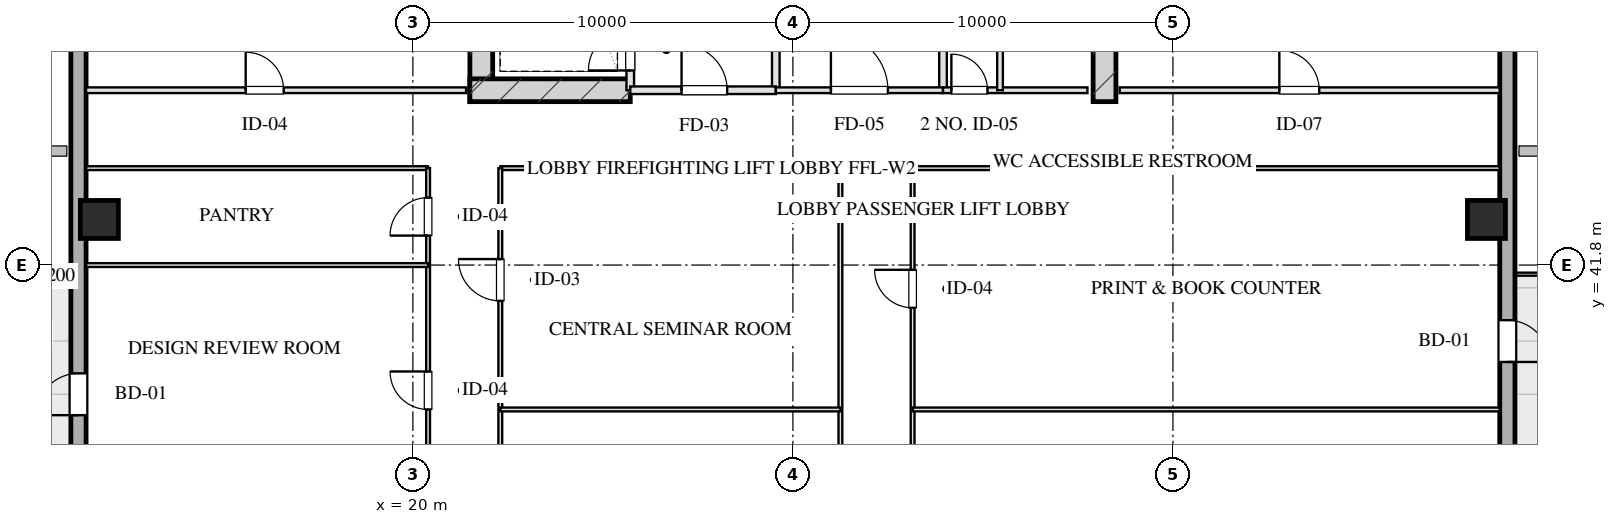
"""IFC4 building model, lengths in metres.
Left out: names, types, materials, properties, quantities, classifications, styles, units other than length and angle.
Written with IfcOpenShell. Run it as: python <this file> out.ifc"""

import sys

from ifc_helpers import new_model, si_unit, direction, frame, frame_2d, origin, origin_2d, place, context, subcontext, project, spatial, rectangle, hollow_rectangle, extrude, element, fill, save


model = new_model("IFC4")
c1 = context("Model", 3, precision=1e-05, world=origin(), true_north=direction((0.0, 1.0)))
c2 = subcontext(c1, "Body", "Model", "MODEL_VIEW")
j1 = project(units=[si_unit("LENGTHUNIT", "METRE"), si_unit("PLANEANGLEUNIT", "RADIAN")], contexts=[c1])
p1 = place(None, origin())
s1 = spatial("IfcSite", under=j1, at=p1, CompositionType="ELEMENT")
p2 = place(p1, origin())
s2 = spatial("IfcBuilding", under=s1, at=p2, CompositionType="ELEMENT")
p3 = place(p2, frame((0.0, 0.0, 142.6)))
s3 = spatial("IfcBuildingStorey", under=s2, at=p3, CompositionType="ELEMENT", Elevation=142.6)
for number, where, z_axis, x_axis in (
    (1, (21.8, 46.1, 0.0), (0.0, 0.0, 1.0), (0.0, 1.0, 0.0)),
    (2, (38.2, 46.1, 0.0), (0.0, 0.0, 1.0), (0.0, 1.0, 0.0)),
):
    element("IfcWall", number, at=place(p3, frame(where, z_axis=z_axis, x_axis=x_axis)), inside=s3, PredefinedType="SHEAR", context=c2, shape_type="SweptSolid", body=[
        extrude(rectangle(XDim=9.48, YDim=0.6, at=frame_2d((4.74, 0.0))), origin(), (0.0, 0.0, 1.0), 3.45),
    ])
p4 = place(p3, frame((21.5, 46.4, 0.0), z_axis=(0.0, 0.0, 1.0), x_axis=(1.0, 0.0, 0.0)))
e3 = element("IfcWall", 3, at=p4, inside=s3, PredefinedType="SHEAR", context=c2, shape_type="SweptSolid", body=[
    extrude(rectangle(XDim=4.22, YDim=0.6, at=frame_2d((2.11, 0.0))), origin(), (0.0, 0.0, 1.0), 3.45),
])
for number, where, z_axis, x_axis in (
    (4, (11.75, 43.0, 0.0), (0.0, 0.0, 1.0), (1.0, 0.0, 0.0)),
    (5, (48.25, 43.0, 0.0), (0.0, 0.0, 1.0), (1.0, 0.0, 0.0)),
):
    element("IfcColumn", number, at=place(p3, frame(where, z_axis=z_axis, x_axis=x_axis)), inside=s3, PredefinedType="COLUMN", context=c2, shape_type="SweptSolid", body=[
        extrude(hollow_rectangle(XDim=1.0, YDim=1.0, WallThickness=0.036, at=origin_2d()), origin(), (0.0, 0.0, 1.0), 3.451),
    ])
p5 = place(p3, frame((11.2, 9.0, 0.0), z_axis=(0.0, 0.0, 1.0), x_axis=(0.0, 1.0, 0.0)))
e6 = element("IfcWall", 6, at=p5, inside=s3, PredefinedType="SOLIDWALL", context=c2, shape_type="SweptSolid", body=[
    extrude(rectangle(XDim=50.0, YDim=0.4, at=frame_2d((25.0, 0.0))), origin(), (0.0, 0.0, 1.0), 2.61),
])
p6 = place(p5, frame((28.85, 0.0, 0.0)))
e7 = element("IfcOpeningElement", 7, at=p6, cuts=e6, PredefinedType="OPENING", context=c2, shape_type="SweptSolid", body=[
    extrude(rectangle(XDim=1.1, YDim=2.15, at=frame_2d((0.55, 1.075))), frame((0.0, 0.21, 0.0), z_axis=(0.0, -1.0, 0.0), x_axis=(1.0, 0.0, 0.0)), (0.0, 0.0, 1.0), 0.42),
])
p7 = place(p3, frame((48.8, 59.0, 0.0), z_axis=(0.0, 0.0, 1.0), x_axis=(0.0, -1.0, 0.0)))
e8 = element("IfcWall", 8, at=p7, inside=s3, PredefinedType="SOLIDWALL", context=c2, shape_type="SweptSolid", body=[
    extrude(rectangle(XDim=50.0, YDim=0.4, at=frame_2d((25.0, 0.0))), origin(), (0.0, 0.0, 1.0), 2.61),
])
p8 = place(p7, frame((30.275, 0.0, 0.75)))
e9 = element("IfcOpeningElement", 9, at=p8, cuts=e8, PredefinedType="OPENING", context=c2, shape_type="SweptSolid", body=[
    extrude(rectangle(XDim=2.25, YDim=1.46, at=frame_2d((1.125, 0.73))), frame((0.0, 0.21, 0.0), z_axis=(0.0, -1.0, 0.0), x_axis=(1.0, 0.0, 0.0)), (0.0, 0.0, 1.0), 0.42),
])
p9 = place(p7, frame((18.65, 0.0, 0.0)))
e10 = element("IfcOpeningElement", 10, at=p9, cuts=e8, PredefinedType="OPENING", context=c2, shape_type="SweptSolid", body=[
    extrude(rectangle(XDim=1.1, YDim=2.15, at=frame_2d((0.55, 1.075))), frame((0.0, 0.21, 0.0), z_axis=(0.0, -1.0, 0.0), x_axis=(1.0, 0.0, 0.0)), (0.0, 0.0, 1.0), 0.42),
])
p10 = place(p3, frame((25.72, 46.4, 0.0), z_axis=(0.0, 0.0, 1.0), x_axis=(0.0, 1.0, 0.0)))
e11 = element("IfcWall", 11, at=p10, inside=s3, PredefinedType="PARTITIONING", context=c2, shape_type="SweptSolid", body=[
    extrude(rectangle(XDim=1.9, YDim=0.2, at=frame_2d((0.95, 0.0))), origin(), (0.0, 0.0, 1.0), 3.175),
])
p11 = place(p10, frame((0.52, 0.0, 0.0)))
e12 = element("IfcOpeningElement", 12, at=p11, cuts=e11, PredefinedType="OPENING", context=c2, shape_type="SweptSolid", body=[
    extrude(rectangle(XDim=1.1, YDim=2.05, at=frame_2d((0.55, 1.025))), frame((0.0, 0.11, 0.0), z_axis=(0.0, -1.0, 0.0), x_axis=(1.0, 0.0, 0.0)), (0.0, 0.0, 1.0), 0.22),
])
p12 = place(p3, frame((29.55, 46.4, 0.0), z_axis=(0.0, 0.0, 1.0), x_axis=(0.0, 1.0, 0.0)))
e13 = element("IfcWall", 13, at=p12, inside=s3, PredefinedType="PARTITIONING", context=c2, shape_type="SweptSolid", body=[
    extrude(rectangle(XDim=8.43, YDim=0.2, at=frame_2d((4.215, 0.0))), origin(), (0.0, 0.0, 1.0), 3.175),
])
p13 = place(p3, frame((25.72, 46.4, 0.0), z_axis=(0.0, 0.0, 1.0), x_axis=(1.0, 0.0, 0.0)))
e14 = element("IfcWall", 14, at=p13, inside=s3, PredefinedType="PARTITIONING", context=c2, shape_type="SweptSolid", body=[
    extrude(rectangle(XDim=3.83, YDim=0.2, at=frame_2d((1.915, 0.0))), origin(), (0.0, 0.0, 1.0), 3.175),
])
p14 = place(p13, frame((1.35, 0.0, 0.0)))
e15 = element("IfcOpeningElement", 15, at=p14, cuts=e14, PredefinedType="OPENING", context=c2, shape_type="SweptSolid", body=[
    extrude(rectangle(XDim=1.2, YDim=2.05, at=frame_2d((0.6, 1.025))), frame((0.0, 0.11, 0.0), z_axis=(0.0, -1.0, 0.0), x_axis=(1.0, 0.0, 0.0)), (0.0, 0.0, 1.0), 0.22),
])
p15 = place(p3, frame((33.95, 46.4, 0.0), z_axis=(0.0, 0.0, 1.0), x_axis=(0.0, 1.0, 0.0)))
e16 = element("IfcWall", 16, at=p15, inside=s3, PredefinedType="PARTITIONING", context=c2, shape_type="SweptSolid", body=[
    extrude(rectangle(XDim=8.43, YDim=0.2, at=frame_2d((4.215, 0.0))), origin(), (0.0, 0.0, 1.0), 3.175),
])
p16 = place(p3, frame((29.55, 46.4, 0.0), z_axis=(0.0, 0.0, 1.0), x_axis=(1.0, 0.0, 0.0)))
e17 = element("IfcWall", 17, at=p16, inside=s3, PredefinedType="PARTITIONING", context=c2, shape_type="SweptSolid", body=[
    extrude(rectangle(XDim=4.4, YDim=0.15, at=frame_2d((2.2, 0.0))), origin(), (0.0, 0.0, 1.0), 3.175),
])
p17 = place(p16, frame((1.45, 0.0, 0.0)))
e18 = element("IfcOpeningElement", 18, at=p17, cuts=e17, PredefinedType="OPENING", context=c2, shape_type="SweptSolid", body=[
    extrude(rectangle(XDim=1.5, YDim=2.05, at=frame_2d((0.75, 1.025))), frame((0.0, 0.085, 0.0), z_axis=(0.0, -1.0, 0.0), x_axis=(1.0, 0.0, 0.0)), (0.0, 0.0, 1.0), 0.17),
])
p18 = place(p3, frame((33.95, 46.4, 0.0), z_axis=(0.0, 0.0, 1.0), x_axis=(1.0, 0.0, 0.0)))
e19 = element("IfcWall", 19, at=p18, inside=s3, PredefinedType="PARTITIONING", context=c2, shape_type="SweptSolid", body=[
    extrude(rectangle(XDim=3.8, YDim=0.15, at=frame_2d((1.9, 0.0))), origin(), (0.0, 0.0, 1.0), 3.175),
])
p19 = place(p18, frame((0.22, 0.0, 0.0)))
e20 = element("IfcOpeningElement", 20, at=p19, cuts=e19, PredefinedType="OPENING", context=c2, shape_type="SweptSolid", body=[
    extrude(rectangle(XDim=0.95, YDim=2.05, at=frame_2d((0.475, 1.025))), frame((0.0, 0.085, 0.0), z_axis=(0.0, -1.0, 0.0), x_axis=(1.0, 0.0, 0.0)), (0.0, 0.0, 1.0), 0.17),
])
p20 = place(p3, frame((35.45, 46.4, 0.0), z_axis=(0.0, 0.0, 1.0), x_axis=(0.0, 1.0, 0.0)))
e21 = element("IfcWall", 21, at=p20, inside=s3, PredefinedType="PARTITIONING", context=c2, shape_type="SweptSolid", body=[
    extrude(rectangle(XDim=8.43, YDim=0.15, at=frame_2d((4.215, 0.0))), origin(), (0.0, 0.0, 1.0), 2.815),
])
p21 = place(p20, frame((2.55, 0.0, 0.0)))
e22 = element("IfcOpeningElement", 22, at=p21, cuts=e21, PredefinedType="OPENING", context=c2, shape_type="SweptSolid", body=[
    extrude(rectangle(XDim=0.95, YDim=2.05, at=frame_2d((0.475, 1.025))), frame((0.0, 0.085, 0.0), z_axis=(0.0, -1.0, 0.0), x_axis=(1.0, 0.0, 0.0)), (0.0, 0.0, 1.0), 0.17),
])
p22 = place(p20, frame((5.8, 0.0, 0.0)))
e23 = element("IfcOpeningElement", 23, at=p22, cuts=e21, PredefinedType="OPENING", context=c2, shape_type="SweptSolid", body=[
    extrude(rectangle(XDim=0.9, YDim=2.05, at=frame_2d((0.45, 1.025))), frame((0.0, 0.085, 0.0), z_axis=(0.0, -1.0, 0.0), x_axis=(1.0, 0.0, 0.0)), (0.0, 0.0, 1.0), 0.17),
])
p23 = place(p3, frame((11.4, 46.4, 0.0), z_axis=(0.0, 0.0, 1.0), x_axis=(1.0, 0.0, 0.0)))
e24 = element("IfcWall", 24, at=p23, inside=s3, PredefinedType="PARTITIONING", context=c2, shape_type="SweptSolid", body=[
    extrude(rectangle(XDim=10.0, YDim=0.15, at=frame_2d((5.0, 0.0))), origin(), (0.0, 0.0, 1.0), 3.175),
])
p24 = place(p23, frame((4.2, 0.0, 0.0)))
e25 = element("IfcOpeningElement", 25, at=p24, cuts=e24, PredefinedType="OPENING", context=c2, shape_type="SweptSolid", body=[
    extrude(rectangle(XDim=1.0, YDim=2.05, at=frame_2d((0.5, 1.025))), frame((0.0, 0.085, 0.0), z_axis=(0.0, -1.0, 0.0), x_axis=(1.0, 0.0, 0.0)), (0.0, 0.0, 1.0), 0.17),
])
p25 = place(p3, frame((38.6, 46.4, 0.0), z_axis=(0.0, 0.0, 1.0), x_axis=(1.0, 0.0, 0.0)))
e26 = element("IfcWall", 26, at=p25, inside=s3, PredefinedType="PARTITIONING", context=c2, shape_type="SweptSolid", body=[
    extrude(rectangle(XDim=10.0, YDim=0.15, at=frame_2d((5.0, 0.0))), origin(), (0.0, 0.0, 1.0), 3.175),
])
p26 = place(p25, frame((4.2, 0.0, 0.0)))
e27 = element("IfcOpeningElement", 27, at=p26, cuts=e26, PredefinedType="OPENING", context=c2, shape_type="SweptSolid", body=[
    extrude(rectangle(XDim=1.05, YDim=2.05, at=frame_2d((0.525, 1.025))), frame((0.0, 0.085, 0.0), z_axis=(0.0, -1.0, 0.0), x_axis=(1.0, 0.0, 0.0)), (0.0, 0.0, 1.0), 0.17),
])
p27 = place(p3, frame((11.4, 44.35, 0.0), z_axis=(0.0, 0.0, 1.0), x_axis=(1.0, 0.0, 0.0)))
e28 = element("IfcWall", 28, at=p27, inside=s3, PredefinedType="MOVABLE", context=c2, shape_type="SweptSolid", body=[
    extrude(rectangle(XDim=9.0, YDim=0.1, at=frame_2d((4.5, 0.0))), origin(), (0.0, 0.0, 1.0), 3.175),
])
p28 = place(p3, frame((22.3, 44.35, 0.0), z_axis=(0.0, 0.0, 1.0), x_axis=(1.0, 0.0, 0.0)))
e29 = element("IfcWall", 29, at=p28, inside=s3, PredefinedType="MOVABLE", context=c2, shape_type="SweptSolid", body=[
    extrude(rectangle(XDim=8.95, YDim=0.1, at=frame_2d((4.475, 0.0))), origin(), (0.0, 0.0, 1.0), 3.175),
])
p29 = place(p3, frame((33.15, 44.35, 0.0), z_axis=(0.0, 0.0, 1.0), x_axis=(1.0, 0.0, 0.0)))
e30 = element("IfcWall", 30, at=p29, inside=s3, PredefinedType="MOVABLE", context=c2, shape_type="SweptSolid", body=[
    extrude(rectangle(XDim=15.45, YDim=0.1, at=frame_2d((7.725, 0.0))), origin(), (0.0, 0.0, 1.0), 3.175),
])
p30 = place(p3, frame((20.4, 23.65, 0.0), z_axis=(0.0, 0.0, 1.0), x_axis=(0.0, 1.0, 0.0)))
e31 = element("IfcWall", 31, at=p30, inside=s3, PredefinedType="MOVABLE", context=c2, shape_type="SweptSolid", body=[
    extrude(rectangle(XDim=20.7, YDim=0.1, at=frame_2d((10.35, 0.0))), origin(), (0.0, 0.0, 1.0), 3.175),
])
p31 = place(p30, frame((0.775, 0.0, 0.0)))
e32 = element("IfcOpeningElement", 32, at=p31, cuts=e31, PredefinedType="OPENING", context=c2, shape_type="SweptSolid", body=[
    extrude(rectangle(XDim=1.0, YDim=2.05, at=frame_2d((0.5, 1.025))), frame((0.0, 0.06, 0.0), z_axis=(0.0, -1.0, 0.0), x_axis=(1.0, 0.0, 0.0)), (0.0, 0.0, 1.0), 0.12),
])
p32 = place(p30, frame((5.35, 0.0, 0.0)))
e33 = element("IfcOpeningElement", 33, at=p32, cuts=e31, PredefinedType="OPENING", context=c2, shape_type="SweptSolid", body=[
    extrude(rectangle(XDim=1.0, YDim=2.05, at=frame_2d((0.5, 1.025))), frame((0.0, 0.06, 0.0), z_axis=(0.0, -1.0, 0.0), x_axis=(1.0, 0.0, 0.0)), (0.0, 0.0, 1.0), 0.12),
])
p33 = place(p30, frame((9.85, 0.0, 0.0)))
e34 = element("IfcOpeningElement", 34, at=p33, cuts=e31, PredefinedType="OPENING", context=c2, shape_type="SweptSolid", body=[
    extrude(rectangle(XDim=1.0, YDim=2.05, at=frame_2d((0.5, 1.025))), frame((0.0, 0.06, 0.0), z_axis=(0.0, -1.0, 0.0), x_axis=(1.0, 0.0, 0.0)), (0.0, 0.0, 1.0), 0.12),
])
p34 = place(p30, frame((14.35, 0.0, 0.0)))
e35 = element("IfcOpeningElement", 35, at=p34, cuts=e31, PredefinedType="OPENING", context=c2, shape_type="SweptSolid", body=[
    extrude(rectangle(XDim=1.0, YDim=2.05, at=frame_2d((0.5, 1.025))), frame((0.0, 0.06, 0.0), z_axis=(0.0, -1.0, 0.0), x_axis=(1.0, 0.0, 0.0)), (0.0, 0.0, 1.0), 0.12),
])
p35 = place(p30, frame((18.925, 0.0, 0.0)))
e36 = element("IfcOpeningElement", 36, at=p35, cuts=e31, PredefinedType="OPENING", context=c2, shape_type="SweptSolid", body=[
    extrude(rectangle(XDim=1.0, YDim=2.05, at=frame_2d((0.5, 1.025))), frame((0.0, 0.06, 0.0), z_axis=(0.0, -1.0, 0.0), x_axis=(1.0, 0.0, 0.0)), (0.0, 0.0, 1.0), 0.12),
])
p36 = place(p3, frame((22.3, 23.65, 0.0), z_axis=(0.0, 0.0, 1.0), x_axis=(0.0, 1.0, 0.0)))
e37 = element("IfcWall", 37, at=p36, inside=s3, PredefinedType="MOVABLE", context=c2, shape_type="SweptSolid", body=[
    extrude(rectangle(XDim=20.7, YDim=0.1, at=frame_2d((10.35, 0.0))), origin(), (0.0, 0.0, 1.0), 3.175),
])
p37 = place(p36, frame((2.857, 0.0, 0.0)))
e38 = element("IfcOpeningElement", 38, at=p37, cuts=e37, PredefinedType="OPENING", context=c2, shape_type="SweptSolid", body=[
    extrude(rectangle(XDim=1.1, YDim=2.05, at=frame_2d((0.55, 1.025))), frame((0.0, 0.06, 0.0), z_axis=(0.0, -1.0, 0.0), x_axis=(1.0, 0.0, 0.0)), (0.0, 0.0, 1.0), 0.12),
])
p38 = place(p36, frame((17.208, 0.0, 0.0)))
e39 = element("IfcOpeningElement", 39, at=p38, cuts=e37, PredefinedType="OPENING", context=c2, shape_type="SweptSolid", body=[
    extrude(rectangle(XDim=1.1, YDim=2.05, at=frame_2d((0.55, 1.025))), frame((0.0, 0.06, 0.0), z_axis=(0.0, -1.0, 0.0), x_axis=(1.0, 0.0, 0.0)), (0.0, 0.0, 1.0), 0.12),
])
p39 = place(p3, frame((31.25, 23.65, 0.0), z_axis=(0.0, 0.0, 1.0), x_axis=(0.0, 1.0, 0.0)))
e40 = element("IfcWall", 40, at=p39, inside=s3, PredefinedType="MOVABLE", context=c2, shape_type="SweptSolid", body=[
    extrude(rectangle(XDim=20.7, YDim=0.1, at=frame_2d((10.35, 0.0))), origin(), (0.0, 0.0, 1.0), 3.175),
])
p40 = place(p39, frame((9.71, 0.0, 0.0)))
e41 = element("IfcOpeningElement", 41, at=p40, cuts=e40, PredefinedType="OPENING", context=c2, shape_type="SweptSolid", body=[
    extrude(rectangle(XDim=1.1, YDim=2.05, at=frame_2d((0.55, 1.025))), frame((0.0, 0.06, 0.0), z_axis=(0.0, -1.0, 0.0), x_axis=(1.0, 0.0, 0.0)), (0.0, 0.0, 1.0), 0.12),
])
p41 = place(p3, frame((33.15, 23.65, 0.0), z_axis=(0.0, 0.0, 1.0), x_axis=(0.0, 1.0, 0.0)))
e42 = element("IfcWall", 42, at=p41, inside=s3, PredefinedType="MOVABLE", context=c2, shape_type="SweptSolid", body=[
    extrude(rectangle(XDim=20.7, YDim=0.1, at=frame_2d((10.35, 0.0))), origin(), (0.0, 0.0, 1.0), 3.175),
])
p42 = place(p41, frame((2.667, 0.0, 0.0)))
e43 = element("IfcOpeningElement", 43, at=p42, cuts=e42, PredefinedType="OPENING", context=c2, shape_type="SweptSolid", body=[
    extrude(rectangle(XDim=0.85, YDim=2.05, at=frame_2d((0.425, 1.025))), frame((0.0, 0.06, 0.0), z_axis=(0.0, -1.0, 0.0), x_axis=(1.0, 0.0, 0.0)), (0.0, 0.0, 1.0), 0.12),
])
p43 = place(p41, frame((9.843, 0.0, 0.0)))
e44 = element("IfcOpeningElement", 44, at=p43, cuts=e42, PredefinedType="OPENING", context=c2, shape_type="SweptSolid", body=[
    extrude(rectangle(XDim=1.0, YDim=2.05, at=frame_2d((0.5, 1.025))), frame((0.0, 0.06, 0.0), z_axis=(0.0, -1.0, 0.0), x_axis=(1.0, 0.0, 0.0)), (0.0, 0.0, 1.0), 0.12),
])
p44 = place(p41, frame((17.025, 0.0, 0.0)))
e45 = element("IfcOpeningElement", 45, at=p44, cuts=e42, PredefinedType="OPENING", context=c2, shape_type="SweptSolid", body=[
    extrude(rectangle(XDim=1.0, YDim=2.05, at=frame_2d((0.5, 1.025))), frame((0.0, 0.06, 0.0), z_axis=(0.0, -1.0, 0.0), x_axis=(1.0, 0.0, 0.0)), (0.0, 0.0, 1.0), 0.12),
])
p45 = place(p3, frame((22.3, 38.0, 0.0), z_axis=(0.0, 0.0, 1.0), x_axis=(1.0, 0.0, 0.0)))
e46 = element("IfcWall", 46, at=p45, inside=s3, PredefinedType="MOVABLE", context=c2, shape_type="SweptSolid", body=[
    extrude(rectangle(XDim=8.95, YDim=0.1, at=frame_2d((4.475, 0.0))), origin(), (0.0, 0.0, 1.0), 3.175),
])
p46 = place(p3, frame((11.4, 41.8, 0.0), z_axis=(0.0, 0.0, 1.0), x_axis=(1.0, 0.0, 0.0)))
e47 = element("IfcWall", 47, at=p46, inside=s3, PredefinedType="MOVABLE", context=c2, shape_type="SweptSolid", body=[
    extrude(rectangle(XDim=9.0, YDim=0.1, at=frame_2d((4.5, 0.0))), origin(), (0.0, 0.0, 1.0), 3.175),
])
p47 = place(p3, frame((33.15, 38.0, 0.0), z_axis=(0.0, 0.0, 1.0), x_axis=(1.0, 0.0, 0.0)))
e48 = element("IfcWall", 48, at=p47, inside=s3, PredefinedType="MOVABLE", context=c2, shape_type="SweptSolid", body=[
    extrude(rectangle(XDim=15.45, YDim=0.1, at=frame_2d((7.725, 0.0))), origin(), (0.0, 0.0, 1.0), 3.175),
])
p48 = place(p6, origin())
e49 = element("IfcDoor", 49, at=p48, inside=s3, OperationType="SINGLE_SWING_LEFT", PredefinedType="DOOR", context=c2, shape_type="SweptSolid", body=[
    extrude(rectangle(XDim=1.1, YDim=2.15, at=frame_2d((0.55, 1.075))), frame((0.0, 0.025, 0.0), z_axis=(0.0, -1.0, 0.0), x_axis=(1.0, 0.0, 0.0)), (0.0, 0.0, 1.0), 0.05),
])
fill(e7, e49)
p49 = place(p9, origin())
e50 = element("IfcDoor", 50, at=p49, inside=s3, OperationType="SINGLE_SWING_RIGHT", PredefinedType="DOOR", context=c2, shape_type="SweptSolid", body=[
    extrude(rectangle(XDim=1.1, YDim=2.15, at=frame_2d((0.55, 1.075))), frame((0.0, 0.025, 0.0), z_axis=(0.0, -1.0, 0.0), x_axis=(1.0, 0.0, 0.0)), (0.0, 0.0, 1.0), 0.05),
])
fill(e10, e50)
p50 = place(p11, origin())
e51 = element("IfcDoor", 51, at=p50, inside=s3, OperationType="SINGLE_SWING_LEFT", PredefinedType="DOOR", context=c2, shape_type="SweptSolid", body=[
    extrude(rectangle(XDim=1.1, YDim=2.05, at=frame_2d((0.55, 1.025))), frame((0.0, 0.025, 0.0), z_axis=(0.0, -1.0, 0.0), x_axis=(1.0, 0.0, 0.0)), (0.0, 0.0, 1.0), 0.05),
])
fill(e12, e51)
p51 = place(p14, origin())
e52 = element("IfcDoor", 52, at=p51, inside=s3, OperationType="SINGLE_SWING_LEFT", PredefinedType="DOOR", context=c2, shape_type="SweptSolid", body=[
    extrude(rectangle(XDim=1.2, YDim=2.05, at=frame_2d((0.6, 1.025))), frame((0.0, 0.025, 0.0), z_axis=(0.0, -1.0, 0.0), x_axis=(1.0, 0.0, 0.0)), (0.0, 0.0, 1.0), 0.05),
])
fill(e15, e52)
p52 = place(p17, origin())
e53 = element("IfcDoor", 53, at=p52, inside=s3, OperationType="SINGLE_SWING_LEFT", PredefinedType="DOOR", context=c2, shape_type="SweptSolid", body=[
    extrude(rectangle(XDim=1.5, YDim=2.05, at=frame_2d((0.75, 1.025))), frame((0.0, 0.025, 0.0), z_axis=(0.0, -1.0, 0.0), x_axis=(1.0, 0.0, 0.0)), (0.0, 0.0, 1.0), 0.05),
])
fill(e18, e53)
p53 = place(p19, origin())
e54 = element("IfcDoor", 54, at=p53, inside=s3, OperationType="SINGLE_SWING_LEFT", PredefinedType="DOOR", context=c2, shape_type="SweptSolid", body=[
    extrude(rectangle(XDim=0.95, YDim=2.05, at=frame_2d((0.475, 1.025))), frame((0.0, 0.025, 0.0), z_axis=(0.0, -1.0, 0.0), x_axis=(1.0, 0.0, 0.0)), (0.0, 0.0, 1.0), 0.05),
])
fill(e20, e54)
p54 = place(p24, origin())
e55 = element("IfcDoor", 55, at=p54, inside=s3, OperationType="SINGLE_SWING_LEFT", PredefinedType="DOOR", context=c2, shape_type="SweptSolid", body=[
    extrude(rectangle(XDim=1.0, YDim=2.05, at=frame_2d((0.5, 1.025))), frame((0.0, 0.025, 0.0), z_axis=(0.0, -1.0, 0.0), x_axis=(1.0, 0.0, 0.0)), (0.0, 0.0, 1.0), 0.05),
])
fill(e25, e55)
p55 = place(p26, origin())
e56 = element("IfcDoor", 56, at=p55, inside=s3, OperationType="SINGLE_SWING_LEFT", PredefinedType="DOOR", context=c2, shape_type="SweptSolid", body=[
    extrude(rectangle(XDim=1.05, YDim=2.05, at=frame_2d((0.525, 1.025))), frame((0.0, 0.025, 0.0), z_axis=(0.0, -1.0, 0.0), x_axis=(1.0, 0.0, 0.0)), (0.0, 0.0, 1.0), 0.05),
])
fill(e27, e56)
p56 = place(p34, origin())
e57 = element("IfcDoor", 57, at=p56, inside=s3, OperationType="SINGLE_SWING_RIGHT", PredefinedType="DOOR", context=c2, shape_type="SweptSolid", body=[
    extrude(rectangle(XDim=1.0, YDim=2.05, at=frame_2d((0.5, 1.025))), frame((0.0, 0.025, 0.0), z_axis=(0.0, -1.0, 0.0), x_axis=(1.0, 0.0, 0.0)), (0.0, 0.0, 1.0), 0.05),
])
fill(e35, e57)
p57 = place(p35, origin())
e58 = element("IfcDoor", 58, at=p57, inside=s3, OperationType="SINGLE_SWING_LEFT", PredefinedType="DOOR", context=c2, shape_type="SweptSolid", body=[
    extrude(rectangle(XDim=1.0, YDim=2.05, at=frame_2d((0.5, 1.025))), frame((0.0, 0.025, 0.0), z_axis=(0.0, -1.0, 0.0), x_axis=(1.0, 0.0, 0.0)), (0.0, 0.0, 1.0), 0.05),
])
fill(e36, e58)
p58 = place(p38, origin())
e59 = element("IfcDoor", 59, at=p58, inside=s3, OperationType="SINGLE_SWING_RIGHT", PredefinedType="DOOR", context=c2, shape_type="SweptSolid", body=[
    extrude(rectangle(XDim=1.1, YDim=2.05, at=frame_2d((0.55, 1.025))), frame((0.0, 0.025, 0.0), z_axis=(0.0, -1.0, 0.0), x_axis=(1.0, 0.0, 0.0)), (0.0, 0.0, 1.0), 0.05),
])
fill(e39, e59)
p59 = place(p44, origin())
e60 = element("IfcDoor", 60, at=p59, inside=s3, OperationType="SINGLE_SWING_RIGHT", PredefinedType="DOOR", context=c2, shape_type="SweptSolid", body=[
    extrude(rectangle(XDim=1.0, YDim=2.05, at=frame_2d((0.5, 1.025))), frame((0.0, 0.025, 0.0), z_axis=(0.0, -1.0, 0.0), x_axis=(1.0, 0.0, 0.0)), (0.0, 0.0, 1.0), 0.05),
])
fill(e45, e60)
save(model, sys.argv[1])
